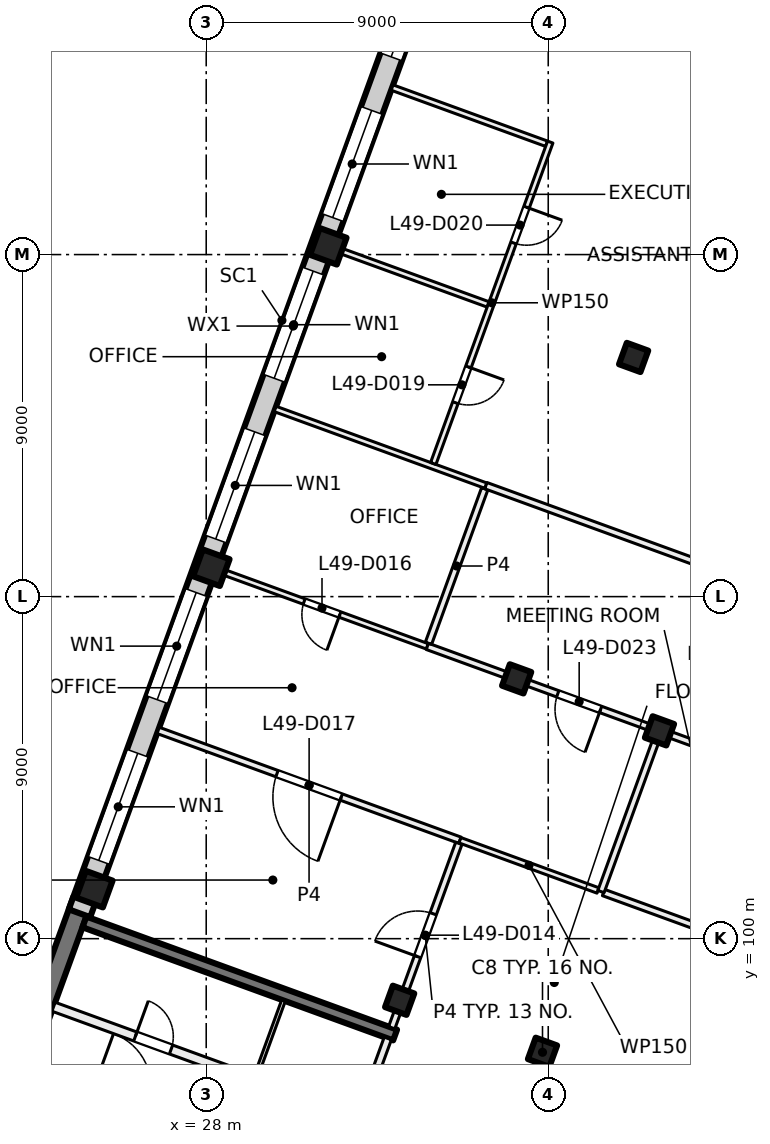
"""IFC4 building model, lengths in metres.
Left out: names, types, materials, properties, quantities, classifications, styles, units other than length and angle.
Written with IfcOpenShell. Run it as: python <this file> out.ifc"""

import sys

from ifc_helpers import new_model, si_unit, direction, frame, frame_2d, origin, origin_2d, place, context, subcontext, project, spatial, rectangle, extrude, element, fill, save


model = new_model("IFC4")
c1 = context("Model", 3, precision=1e-05, world=origin(), true_north=direction((0.0, 1.0)))
c2 = subcontext(c1, "Body", "Model", "MODEL_VIEW")
j1 = project(units=[si_unit("LENGTHUNIT", "METRE"), si_unit("PLANEANGLEUNIT", "RADIAN")], contexts=[c1])
p1 = place(None, origin())
s1 = spatial("IfcSite", under=j1, at=p1, CompositionType="ELEMENT")
p2 = place(p1, origin())
s2 = spatial("IfcBuilding", under=s1, at=p2, CompositionType="ELEMENT")
p3 = place(p2, frame((0.0, 0.0, 208.0)))
s3 = spatial("IfcBuildingStorey", under=s2, at=p3, CompositionType="ELEMENT", Elevation=208.0)
for number, where, z_axis, x_axis in (
    (1, (39.927, 105.468, 0.0), (0.0, 0.0, 1.0), (-0.342, -0.94, 0.0)),
    (2, (36.849, 97.011, 0.0), (0.0, 0.0, 1.0), (-0.342, -0.94, 0.0)),
    (3, (39.247, 115.293, 0.0), (0.0, 0.0, 1.0), (-0.342, -0.94, 0.0)),
    (4, (36.169, 106.836, 0.0), (0.0, 0.0, 1.0), (-0.342, -0.94, 0.0)),
    (5, (33.091, 98.379, 0.0), (0.0, 0.0, 1.0), (-0.342, -0.94, 0.0)),
):
    element("IfcColumn", number, at=place(p3, frame(where, z_axis=z_axis, x_axis=x_axis)), inside=s3, PredefinedType="COLUMN", context=c2, shape_type="SweptSolid", body=[
        extrude(rectangle(XDim=0.6, YDim=0.6, at=origin_2d()), origin(), (0.0, 0.0, 1.0), 4.0),
    ])
for number, where, z_axis, x_axis in (
    (6, (31.212, 118.218, 0.0), (0.0, 0.0, 1.0), (-0.342, -0.94, 0.0)),
    (7, (28.134, 109.76, 0.0), (0.0, 0.0, 1.0), (-0.342, -0.94, 0.0)),
    (8, (25.056, 101.303, 0.0), (0.0, 0.0, 1.0), (-0.342, -0.94, 0.0)),
):
    element("IfcColumn", number, at=place(p3, frame(where, z_axis=z_axis, x_axis=x_axis)), inside=s3, PredefinedType="COLUMN", context=c2, shape_type="SweptSolid", body=[
        extrude(rectangle(XDim=0.75, YDim=0.75, at=origin_2d()), origin(), (0.0, 0.0, 1.0), 4.0),
    ])
p4 = place(p3, frame((21.67, 92.585, 0.0), z_axis=(0.0, 0.0, 1.0), x_axis=(0.342035714298, 0.93968695327, 0.0)))
e9 = element("IfcWall", 9, at=p4, inside=s3, PredefinedType="SHEAR", context=c2, shape_type="SweptSolid", body=[
    extrude(rectangle(XDim=8.975, YDim=0.5, at=frame_2d((4.488, 0.0))), origin(), (0.0, 0.0, 1.0), 4.0),
])
p5 = place(p3, frame((32.971, 97.465, 0.0), z_axis=(0.0, 0.0, 1.0), x_axis=(-0.939695066972, 0.34201342241, 0.0)))
e10 = element("IfcWall", 10, at=p5, inside=s3, PredefinedType="SHEAR", context=c2, shape_type="SweptSolid", body=[
    extrude(rectangle(XDim=8.7, YDim=0.3, at=frame_2d((4.35, 0.0))), origin(), (0.0, 0.0, 1.0), 4.0),
])
p6 = place(p3, frame((24.666, 100.669, 0.0), z_axis=(0.0, 0.0, 1.0), x_axis=(0.34201964167, 0.939692803373, 0.0)))
e11 = element("IfcWall", 11, at=p6, inside=s3, PredefinedType="SOLIDWALL", context=c2, shape_type="SweptSolid", body=[
    extrude(rectangle(XDim=32.884, YDim=0.6, at=frame_2d((16.442, 0.0))), origin(), (0.0, 0.0, 1.0), 3.625),
])
p7 = place(p6, frame((1.48, 0.0, 0.9)))
e12 = element("IfcOpeningElement", 12, at=p7, cuts=e11, PredefinedType="OPENING", context=c2, shape_type="SweptSolid", body=[
    extrude(rectangle(XDim=3.0, YDim=2.4, at=frame_2d((1.5, 1.2))), frame((0.0, 0.31, 0.0), z_axis=(0.0, -1.0, 0.0), x_axis=(1.0, 0.0, 0.0)), (0.0, 0.0, 1.0), 0.62),
])
p8 = place(p6, frame((5.98, 0.0, 0.9)))
e13 = element("IfcOpeningElement", 13, at=p8, cuts=e11, PredefinedType="OPENING", context=c2, shape_type="SweptSolid", body=[
    extrude(rectangle(XDim=3.0, YDim=2.4, at=frame_2d((1.5, 1.2))), frame((0.0, 0.31, 0.0), z_axis=(0.0, -1.0, 0.0), x_axis=(1.0, 0.0, 0.0)), (0.0, 0.0, 1.0), 0.62),
])
p9 = place(p6, frame((10.48, 0.0, 0.9)))
e14 = element("IfcOpeningElement", 14, at=p9, cuts=e11, PredefinedType="OPENING", context=c2, shape_type="SweptSolid", body=[
    extrude(rectangle(XDim=3.0, YDim=2.4, at=frame_2d((1.5, 1.2))), frame((0.0, 0.31, 0.0), z_axis=(0.0, -1.0, 0.0), x_axis=(1.0, 0.0, 0.0)), (0.0, 0.0, 1.0), 0.62),
])
p10 = place(p6, frame((14.98, 0.0, 0.9)))
e15 = element("IfcOpeningElement", 15, at=p10, cuts=e11, PredefinedType="OPENING", context=c2, shape_type="SweptSolid", body=[
    extrude(rectangle(XDim=3.0, YDim=2.4, at=frame_2d((1.5, 1.2))), frame((0.0, 0.31, 0.0), z_axis=(0.0, -1.0, 0.0), x_axis=(1.0, 0.0, 0.0)), (0.0, 0.0, 1.0), 0.62),
])
p11 = place(p6, frame((19.48, 0.0, 0.9)))
e16 = element("IfcOpeningElement", 16, at=p11, cuts=e11, PredefinedType="OPENING", context=c2, shape_type="SweptSolid", body=[
    extrude(rectangle(XDim=3.0, YDim=2.4, at=frame_2d((1.5, 1.2))), frame((0.0, 0.31, 0.0), z_axis=(0.0, -1.0, 0.0), x_axis=(1.0, 0.0, 0.0)), (0.0, 0.0, 1.0), 0.62),
])
p12 = place(p6, frame((23.98, 0.0, 0.9)))
e17 = element("IfcOpeningElement", 17, at=p12, cuts=e11, PredefinedType="OPENING", context=c2, shape_type="SweptSolid", body=[
    extrude(rectangle(XDim=3.0, YDim=2.4, at=frame_2d((1.5, 1.2))), frame((0.0, 0.31, 0.0), z_axis=(0.0, -1.0, 0.0), x_axis=(1.0, 0.0, 0.0)), (0.0, 0.0, 1.0), 0.62),
])
p13 = place(p6, frame((28.48, 0.0, 0.9)))
e18 = element("IfcOpeningElement", 18, at=p13, cuts=e11, PredefinedType="OPENING", context=c2, shape_type="SweptSolid", body=[
    extrude(rectangle(XDim=3.0, YDim=2.4, at=frame_2d((1.5, 1.2))), frame((0.0, 0.31, 0.0), z_axis=(0.0, -1.0, 0.0), x_axis=(1.0, 0.0, 0.0)), (0.0, 0.0, 1.0), 0.62),
])
p14 = place(p3, frame((31.427, 93.663, 0.0), z_axis=(0.0, 0.0, 1.0), x_axis=(0.342030870568, 0.93968871632, 0.0)))
e19 = element("IfcWall", 19, at=p14, inside=s3, PredefinedType="PARTITIONING", context=c2, shape_type="SweptSolid", body=[
    extrude(rectangle(XDim=3.95, YDim=0.2, at=frame_2d((1.975, 0.0))), origin(), (0.0, 0.0, 1.0), 3.625),
])
p15 = place(p14, frame((0.3, 0.0, 0.0)))
e20 = element("IfcOpeningElement", 20, at=p15, cuts=e19, PredefinedType="OPENING", context=c2, shape_type="SweptSolid", body=[
    extrude(rectangle(XDim=1.2, YDim=2.1, at=frame_2d((0.6, 1.05))), frame((0.0, 0.11, 0.0), z_axis=(0.0, -1.0, 0.0), x_axis=(1.0, 0.0, 0.0)), (0.0, 0.0, 1.0), 0.22),
])
p16 = place(p3, frame((23.427, 96.682, 0.0), z_axis=(0.0, 0.0, 1.0), x_axis=(0.939690465531, -0.342026064782, 0.0)))
e21 = element("IfcWall", 21, at=p16, inside=s3, PredefinedType="PARTITIONING", context=c2, shape_type="SweptSolid", body=[
    extrude(rectangle(XDim=8.45, YDim=0.2, at=frame_2d((4.225, 0.0))), origin(), (0.0, 0.0, 1.0), 3.625),
])
p17 = place(p16, frame((1.725, 0.0, 0.0)))
e22 = element("IfcOpeningElement", 22, at=p17, cuts=e21, PredefinedType="OPENING", context=c2, shape_type="SweptSolid", body=[
    extrude(rectangle(XDim=1.5, YDim=2.1, at=frame_2d((0.75, 1.05))), frame((0.0, 0.11, 0.0), z_axis=(0.0, -1.0, 0.0), x_axis=(1.0, 0.0, 0.0)), (0.0, 0.0, 1.0), 0.22),
])
p18 = place(p3, frame((23.983, 98.208, 0.0), z_axis=(0.0, 0.0, 1.0), x_axis=(0.939699751196, -0.342000552051, 0.0)))
e23 = element("IfcWall", 23, at=p18, inside=s3, PredefinedType="PARTITIONING", context=c2, shape_type="SweptSolid", body=[
    extrude(rectangle(XDim=8.45, YDim=0.25, at=frame_2d((4.225, 0.0))), origin(), (0.0, 0.0, 1.0), 3.625),
])
p19 = place(p18, frame((6.665, 0.0, 0.0)))
e24 = element("IfcOpeningElement", 24, at=p19, cuts=e23, PredefinedType="OPENING", context=c2, shape_type="SweptSolid", body=[
    extrude(rectangle(XDim=0.8, YDim=2.1, at=frame_2d((0.4, 1.05))), frame((0.0, 0.135, 0.0), z_axis=(0.0, -1.0, 0.0), x_axis=(1.0, 0.0, 0.0)), (0.0, 0.0, 1.0), 0.27),
])
p20 = place(p18, frame((2.29, 0.0, 0.0)))
e25 = element("IfcOpeningElement", 25, at=p20, cuts=e23, PredefinedType="OPENING", context=c2, shape_type="SweptSolid", body=[
    extrude(rectangle(XDim=1.0, YDim=2.1, at=frame_2d((0.5, 1.05))), frame((0.0, 0.135, 0.0), z_axis=(0.0, -1.0, 0.0), x_axis=(1.0, 0.0, 0.0)), (0.0, 0.0, 1.0), 0.27),
])
p21 = place(p3, frame((29.316, 96.4, 0.0), z_axis=(0.0, 0.0, 1.0), x_axis=(0.342023078919, 0.939691552312, 0.0)))
e26 = element("IfcWall", 26, at=p21, inside=s3, PredefinedType="PARTITIONING", context=c2, shape_type="SweptSolid", body=[
    extrude(rectangle(XDim=2.1, YDim=0.1, at=frame_2d((1.05, 0.0))), origin(), (0.0, 0.0, 1.0), 3.625),
])
p22 = place(p3, frame((34.677, 102.59, 0.0), z_axis=(0.0, 0.0, 1.0), x_axis=(-0.939706509432, 0.341981982173, 0.0)))
e27 = element("IfcWall", 27, at=p22, inside=s3, PredefinedType="PARTITIONING", context=c2, shape_type="SweptSolid", body=[
    extrude(rectangle(XDim=8.45, YDim=0.175, at=frame_2d((4.225, 0.0))), origin(), (0.0, 0.0, 1.0), 3.625),
])
p23 = place(p22, frame((3.324, 0.0, 0.0)))
e28 = element("IfcOpeningElement", 28, at=p23, cuts=e27, PredefinedType="OPENING", context=c2, shape_type="SweptSolid", body=[
    extrude(rectangle(XDim=1.8, YDim=2.1, at=frame_2d((0.9, 1.05))), frame((0.0, 0.097, 0.0), z_axis=(0.0, -1.0, 0.0), x_axis=(1.0, 0.0, 0.0)), (0.0, 0.0, 1.0), 0.195),
])
p24 = place(p3, frame((29.814, 113.938, 0.0), z_axis=(0.0, 0.0, 1.0), x_axis=(0.939699162475, -0.342002169647, 0.0)))
e29 = element("IfcWall", 29, at=p24, inside=s3, PredefinedType="PARTITIONING", context=c2, shape_type="SweptSolid", body=[
    extrude(rectangle(XDim=5.901, YDim=0.15, at=frame_2d((2.95, 0.0))), origin(), (0.0, 0.0, 1.0), 3.625),
])
p25 = place(p3, frame((31.353, 118.166, 0.0), z_axis=(0.0, 0.0, 1.0), x_axis=(0.939803311208, -0.341715870634, 0.0)))
e30 = element("IfcWall", 30, at=p25, inside=s3, PredefinedType="PARTITIONING", context=c2, shape_type="SweptSolid", body=[
    extrude(rectangle(XDim=4.325, YDim=0.15, at=frame_2d((2.163, 0.0))), origin(), (0.0, 0.0, 1.0), 3.625),
])
p26 = place(p3, frame((32.892, 122.395, 0.0), z_axis=(0.0, 0.0, 1.0), x_axis=(0.93973078783, -0.341915262023, 0.0)))
e31 = element("IfcWall", 31, at=p26, inside=s3, PredefinedType="PARTITIONING", context=c2, shape_type="SweptSolid", body=[
    extrude(rectangle(XDim=4.326, YDim=0.15, at=frame_2d((2.163, 0.0))), origin(), (0.0, 0.0, 1.0), 3.625),
])
p27 = place(p3, frame((33.819, 107.691, 0.0), z_axis=(0.0, 0.0, 1.0), x_axis=(-0.939684641746, 0.342042064762, 0.0)))
e32 = element("IfcWall", 32, at=p27, inside=s3, PredefinedType="PARTITIONING", context=c2, shape_type="SweptSolid", body=[
    extrude(rectangle(XDim=5.9, YDim=0.15, at=frame_2d((2.95, 0.0))), origin(), (0.0, 0.0, 1.0), 3.625),
])
p28 = place(p27, frame((2.45, 0.0, 0.0)))
e33 = element("IfcOpeningElement", 33, at=p28, cuts=e32, PredefinedType="OPENING", context=c2, shape_type="SweptSolid", body=[
    extrude(rectangle(XDim=1.0, YDim=2.1, at=frame_2d((0.5, 1.05))), frame((0.0, 0.085, 0.0), z_axis=(0.0, -1.0, 0.0), x_axis=(1.0, 0.0, 0.0)), (0.0, 0.0, 1.0), 0.17),
])
p29 = place(p3, frame((44.156, 103.929, 0.0), z_axis=(0.0, 0.0, 1.0), x_axis=(-0.939703317948, 0.341990751683, 0.0)))
e34 = element("IfcWall", 34, at=p29, inside=s3, PredefinedType="PARTITIONING", context=c2, shape_type="SweptSolid", body=[
    extrude(rectangle(XDim=11.0, YDim=0.175, at=frame_2d((5.5, 0.0))), origin(), (0.0, 0.0, 1.0), 3.625),
])
p30 = place(p29, frame((6.149, 0.0, 0.0)))
e35 = element("IfcOpeningElement", 35, at=p30, cuts=e34, PredefinedType="OPENING", context=c2, shape_type="SweptSolid", body=[
    extrude(rectangle(XDim=1.2, YDim=2.1, at=frame_2d((0.6, 1.05))), frame((0.0, 0.097, 0.0), z_axis=(0.0, -1.0, 0.0), x_axis=(1.0, 0.0, 0.0)), (0.0, 0.0, 1.0), 0.195),
])
p31 = place(p3, frame((32.881, 97.657, 0.0), z_axis=(0.0, 0.0, 1.0), x_axis=(0.342058204353, 0.939678766832, 0.0)))
e36 = element("IfcWall", 36, at=p31, inside=s3, PredefinedType="PARTITIONING", context=c2, shape_type="SweptSolid", body=[
    extrude(rectangle(XDim=5.163, YDim=0.175, at=frame_2d((2.581, 0.0))), origin(), (0.0, 0.0, 1.0), 3.625),
])
p32 = place(p31, frame((1.991, 0.0, 0.0)))
e37 = element("IfcOpeningElement", 37, at=p32, cuts=e36, PredefinedType="OPENING", context=c2, shape_type="SweptSolid", body=[
    extrude(rectangle(XDim=1.2, YDim=2.1, at=frame_2d((0.6, 1.05))), frame((0.0, 0.097, 0.0), z_axis=(0.0, -1.0, 0.0), x_axis=(1.0, 0.0, 0.0)), (0.0, 0.0, 1.0), 0.195),
])
p33 = place(p3, frame((34.677, 102.59, 0.0), z_axis=(0.0, 0.0, 1.0), x_axis=(0.939688259666, -0.342032125166, 0.0)))
e38 = element("IfcWall", 38, at=p33, inside=s3, PredefinedType="PARTITIONING", context=c2, shape_type="SweptSolid", body=[
    extrude(rectangle(XDim=3.865, YDim=0.15, at=frame_2d((1.933, 0.0))), origin(), (0.0, 0.0, 1.0), 3.625),
])
p34 = place(p3, frame((35.329, 111.838, 0.0), z_axis=(0.0, 0.0, 1.0), x_axis=(-0.342114607243, -0.939658233355, 0.0)))
e39 = element("IfcWall", 39, at=p34, inside=s3, PredefinedType="PARTITIONING", context=c2, shape_type="SweptSolid", body=[
    extrude(rectangle(XDim=4.326, YDim=0.175, at=frame_2d((2.163, 0.0))), origin(), (0.0, 0.0, 1.0), 3.625),
])
p35 = place(p3, frame((37.053, 120.96, 0.0), z_axis=(0.0, 0.0, 1.0), x_axis=(-0.341997891731, -0.939700719406, 0.0)))
e40 = element("IfcWall", 40, at=p35, inside=s3, PredefinedType="PARTITIONING", context=c2, shape_type="SweptSolid", body=[
    extrude(rectangle(XDim=9.0, YDim=0.15, at=frame_2d((4.5, 0.0))), origin(), (0.0, 0.0, 1.0), 3.625),
])
p36 = place(p35, frame((6.297, 0.0, 0.0)))
e41 = element("IfcOpeningElement", 41, at=p36, cuts=e40, PredefinedType="OPENING", context=c2, shape_type="SweptSolid", body=[
    extrude(rectangle(XDim=1.0, YDim=2.1, at=frame_2d((0.5, 1.05))), frame((0.0, 0.085, 0.0), z_axis=(0.0, -1.0, 0.0), x_axis=(1.0, 0.0, 0.0)), (0.0, 0.0, 1.0), 0.17),
])
p37 = place(p35, frame((1.824, 0.0, 0.0)))
e42 = element("IfcOpeningElement", 42, at=p37, cuts=e40, PredefinedType="OPENING", context=c2, shape_type="SweptSolid", body=[
    extrude(rectangle(XDim=1.0, YDim=2.1, at=frame_2d((0.5, 1.05))), frame((0.0, 0.085, 0.0), z_axis=(0.0, -1.0, 0.0), x_axis=(1.0, 0.0, 0.0)), (0.0, 0.0, 1.0), 0.17),
])
p38 = place(p3, frame((38.455, 101.214, 0.0), z_axis=(0.0, 0.0, 1.0), x_axis=(0.939738687483, -0.341893549585, 0.0)))
e43 = element("IfcWall", 43, at=p38, inside=s3, PredefinedType="PARTITIONING", context=c2, shape_type="SweptSolid", body=[
    extrude(rectangle(XDim=4.429, YDim=0.175, at=frame_2d((2.214, 0.0))), origin(), (0.0, 0.0, 1.0), 3.625),
])
p39 = place(p3, frame((39.897, 105.386, 0.0), z_axis=(0.0, 0.0, 1.0), x_axis=(-0.341951828534, -0.939717482524, 0.0)))
e44 = element("IfcWall", 44, at=p39, inside=s3, PredefinedType="PARTITIONING", context=c2, shape_type="SweptSolid", body=[
    extrude(rectangle(XDim=4.413, YDim=0.175, at=frame_2d((2.207, 0.0))), origin(), (0.0, 0.0, 1.0), 3.625),
])
p40 = place(p3, frame((41.388, 109.726, 0.0), z_axis=(0.0, 0.0, 1.0), x_axis=(-0.939720073348, 0.341944708609, 0.0)))
e45 = element("IfcWall", 45, at=p40, inside=s3, PredefinedType="PARTITIONING", context=c2, shape_type="SweptSolid", body=[
    extrude(rectangle(XDim=6.416, YDim=0.175, at=frame_2d((3.208, 0.0))), origin(), (0.0, 0.0, 1.0), 3.625),
])
p41 = place(p3, frame((50.312, 120.843, 0.0), z_axis=(0.0, 0.0, 1.0), x_axis=(-0.939678226331, 0.342059689177, 0.0)))
e46 = element("IfcWall", 46, at=p41, inside=s3, PredefinedType="PARTITIONING", context=c2, shape_type="SweptSolid", body=[
    extrude(rectangle(XDim=16.901, YDim=0.15, at=frame_2d((8.45, 0.0))), origin(), (0.0, 0.0, 1.0), 3.625),
])
p42 = place(p7, origin())
e47 = element("IfcWindow", 47, at=p42, inside=s3, PartitioningType="SINGLE_PANEL", PredefinedType="WINDOW", context=c2, shape_type="SweptSolid", body=[
    extrude(rectangle(XDim=3.0, YDim=2.4, at=frame_2d((1.5, 1.2))), frame((0.0, 0.03, 0.0), z_axis=(0.0, -1.0, 0.0), x_axis=(1.0, 0.0, 0.0)), (0.0, 0.0, 1.0), 0.06),
])
fill(e12, e47)
p43 = place(p8, origin())
e48 = element("IfcWindow", 48, at=p43, inside=s3, PartitioningType="SINGLE_PANEL", PredefinedType="WINDOW", context=c2, shape_type="SweptSolid", body=[
    extrude(rectangle(XDim=3.0, YDim=2.4, at=frame_2d((1.5, 1.2))), frame((0.0, 0.03, 0.0), z_axis=(0.0, -1.0, 0.0), x_axis=(1.0, 0.0, 0.0)), (0.0, 0.0, 1.0), 0.06),
])
fill(e13, e48)
p44 = place(p9, origin())
e49 = element("IfcWindow", 49, at=p44, inside=s3, PartitioningType="SINGLE_PANEL", PredefinedType="WINDOW", context=c2, shape_type="SweptSolid", body=[
    extrude(rectangle(XDim=3.0, YDim=2.4, at=frame_2d((1.5, 1.2))), frame((0.0, 0.03, 0.0), z_axis=(0.0, -1.0, 0.0), x_axis=(1.0, 0.0, 0.0)), (0.0, 0.0, 1.0), 0.06),
])
fill(e14, e49)
p45 = place(p10, origin())
e50 = element("IfcWindow", 50, at=p45, inside=s3, PartitioningType="SINGLE_PANEL", PredefinedType="WINDOW", context=c2, shape_type="SweptSolid", body=[
    extrude(rectangle(XDim=3.0, YDim=2.4, at=frame_2d((1.5, 1.2))), frame((0.0, 0.03, 0.0), z_axis=(0.0, -1.0, 0.0), x_axis=(1.0, 0.0, 0.0)), (0.0, 0.0, 1.0), 0.06),
])
fill(e15, e50)
p46 = place(p11, origin())
e51 = element("IfcWindow", 51, at=p46, inside=s3, PartitioningType="SINGLE_PANEL", PredefinedType="WINDOW", context=c2, shape_type="SweptSolid", body=[
    extrude(rectangle(XDim=3.0, YDim=2.4, at=frame_2d((1.5, 1.2))), frame((0.0, 0.03, 0.0), z_axis=(0.0, -1.0, 0.0), x_axis=(1.0, 0.0, 0.0)), (0.0, 0.0, 1.0), 0.06),
])
fill(e16, e51)
p47 = place(p12, origin())
e52 = element("IfcWindow", 52, at=p47, inside=s3, PartitioningType="SINGLE_PANEL", PredefinedType="WINDOW", context=c2, shape_type="SweptSolid", body=[
    extrude(rectangle(XDim=3.0, YDim=2.4, at=frame_2d((1.5, 1.2))), frame((0.0, 0.03, 0.0), z_axis=(0.0, -1.0, 0.0), x_axis=(1.0, 0.0, 0.0)), (0.0, 0.0, 1.0), 0.06),
])
fill(e17, e52)
p48 = place(p20, origin())
e53 = element("IfcDoor", 53, at=p48, inside=s3, OperationType="SINGLE_SWING_RIGHT", PredefinedType="DOOR", context=c2, shape_type="SweptSolid", body=[
    extrude(rectangle(XDim=1.0, YDim=2.1, at=frame_2d((0.5, 1.05))), frame((0.0, 0.025, 0.0), z_axis=(0.0, -1.0, 0.0), x_axis=(1.0, 0.0, 0.0)), (0.0, 0.0, 1.0), 0.05),
])
fill(e25, e53)
p49 = place(p32, origin())
e54 = element("IfcDoor", 54, at=p49, inside=s3, OperationType="DOUBLE_DOOR_SINGLE_SWING", PredefinedType="DOOR", context=c2, shape_type="SweptSolid", body=[
    extrude(rectangle(XDim=1.2, YDim=2.1, at=frame_2d((0.6, 1.05))), frame((0.0, 0.025, 0.0), z_axis=(0.0, -1.0, 0.0), x_axis=(1.0, 0.0, 0.0)), (0.0, 0.0, 1.0), 0.05),
])
fill(e37, e54)
p50 = place(p28, origin())
e55 = element("IfcDoor", 55, at=p50, inside=s3, OperationType="SINGLE_SWING_LEFT", PredefinedType="DOOR", context=c2, shape_type="SweptSolid", body=[
    extrude(rectangle(XDim=1.0, YDim=2.1, at=frame_2d((0.5, 1.05))), frame((0.0, 0.025, 0.0), z_axis=(0.0, -1.0, 0.0), x_axis=(1.0, 0.0, 0.0)), (0.0, 0.0, 1.0), 0.05),
])
fill(e33, e55)
p51 = place(p23, origin())
e56 = element("IfcDoor", 56, at=p51, inside=s3, OperationType="DOUBLE_DOOR_SINGLE_SWING", PredefinedType="DOOR", context=c2, shape_type="SweptSolid", body=[
    extrude(rectangle(XDim=1.8, YDim=2.1, at=frame_2d((0.9, 1.05))), frame((0.0, 0.025, 0.0), z_axis=(0.0, -1.0, 0.0), x_axis=(1.0, 0.0, 0.0)), (0.0, 0.0, 1.0), 0.05),
])
fill(e28, e56)
p52 = place(p36, origin())
e57 = element("IfcDoor", 57, at=p52, inside=s3, OperationType="SINGLE_SWING_LEFT", PredefinedType="DOOR", context=c2, shape_type="SweptSolid", body=[
    extrude(rectangle(XDim=1.0, YDim=2.1, at=frame_2d((0.5, 1.05))), frame((0.0, 0.025, 0.0), z_axis=(0.0, -1.0, 0.0), x_axis=(1.0, 0.0, 0.0)), (0.0, 0.0, 1.0), 0.05),
])
fill(e41, e57)
p53 = place(p37, origin())
e58 = element("IfcDoor", 58, at=p53, inside=s3, OperationType="SINGLE_SWING_LEFT", PredefinedType="DOOR", context=c2, shape_type="SweptSolid", body=[
    extrude(rectangle(XDim=1.0, YDim=2.1, at=frame_2d((0.5, 1.05))), frame((0.0, 0.025, 0.0), z_axis=(0.0, -1.0, 0.0), x_axis=(1.0, 0.0, 0.0)), (0.0, 0.0, 1.0), 0.05),
])
fill(e42, e58)
p54 = place(p30, origin())
e59 = element("IfcDoor", 59, at=p54, inside=s3, OperationType="DOUBLE_DOOR_SINGLE_SWING", PredefinedType="DOOR", context=c2, shape_type="SweptSolid", body=[
    extrude(rectangle(XDim=1.2, YDim=2.1, at=frame_2d((0.6, 1.05))), frame((0.0, 0.025, 0.0), z_axis=(0.0, -1.0, 0.0), x_axis=(1.0, 0.0, 0.0)), (0.0, 0.0, 1.0), 0.05),
])
fill(e35, e59)
save(model, sys.argv[1])
